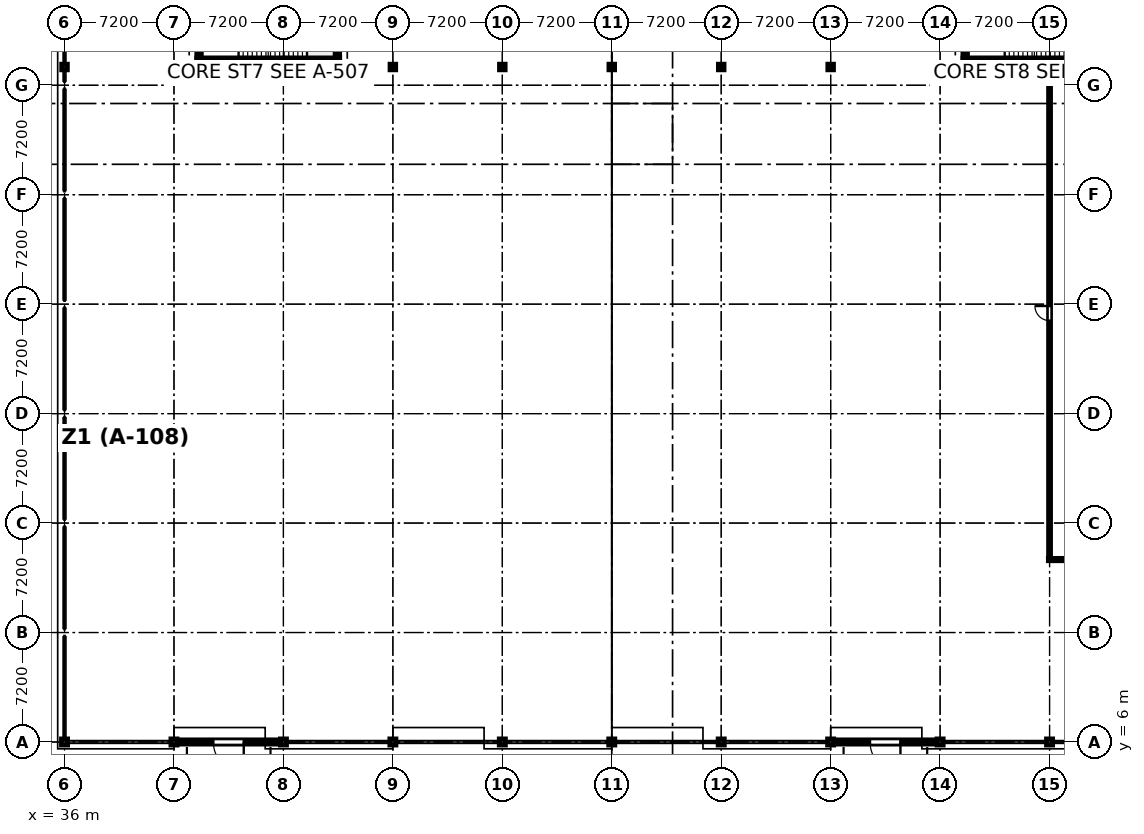
"""IFC4 building model, lengths in metres.
Left out: names, types, materials, properties, quantities, classifications, styles, units other than length and angle.
Written with IfcOpenShell. Run it as: python <this file> out.ifc"""

import sys

from ifc_helpers import new_model, si_unit, direction, frame, frame_2d, origin, origin_2d, place, context, subcontext, project, spatial, rectangle, i_section, extrude, element, fill, save


model = new_model("IFC4")
c1 = context("Model", 3, precision=1e-05, world=origin(), true_north=direction((0.0, 1.0)))
c2 = subcontext(c1, "Body", "Model", "MODEL_VIEW")
j1 = project(units=[si_unit("LENGTHUNIT", "METRE"), si_unit("PLANEANGLEUNIT", "RADIAN")], contexts=[c1])
p1 = place(None, origin())
s1 = spatial("IfcSite", under=j1, at=p1, CompositionType="ELEMENT")
p2 = place(p1, origin())
s2 = spatial("IfcBuilding", under=s1, at=p2, CompositionType="ELEMENT")
p3 = place(p2, origin())
s3 = spatial("IfcBuildingStorey", under=s2, at=p3, CompositionType="ELEMENT", Elevation=0.0)
p4 = place(p3, frame((36.0, 6.0, 0.0), z_axis=(0.0, 0.0, 1.0), x_axis=(1.0, 0.0, 0.0)))
e1 = element("IfcColumn", 1, at=p4, inside=s3, PredefinedType="COLUMN", context=c2, shape_type="SweptSolid", body=[
    extrude(i_section(OverallWidth=0.404, OverallDepth=0.406, WebThickness=0.027, FlangeThickness=0.044, FilletRadius=0.015, at=origin_2d()), origin(), (0.0, 0.0, 1.0), 6.0),
])
p5 = place(p3, frame((36.0, 50.4, 0.0), z_axis=(0.0, 0.0, 1.0), x_axis=(1.0, 0.0, 0.0)))
e2 = element("IfcColumn", 2, at=p5, inside=s3, PredefinedType="COLUMN", context=c2, shape_type="SweptSolid", body=[
    extrude(i_section(OverallWidth=0.373, OverallDepth=0.373, WebThickness=0.016, FlangeThickness=0.026, FilletRadius=0.015, at=origin_2d()), origin(), (0.0, 0.0, 1.0), 5.4),
])
p6 = place(p3, frame((43.2, 6.0, 0.0), z_axis=(0.0, 0.0, 1.0), x_axis=(1.0, 0.0, 0.0)))
e3 = element("IfcColumn", 3, at=p6, inside=s3, PredefinedType="COLUMN", context=c2, shape_type="SweptSolid", body=[
    extrude(i_section(OverallWidth=0.404, OverallDepth=0.406, WebThickness=0.027, FlangeThickness=0.044, FilletRadius=0.015, at=origin_2d()), origin(), (0.0, 0.0, 1.0), 6.0),
])
p7 = place(p3, frame((43.2, 50.4, 0.0), z_axis=(0.0, 0.0, 1.0), x_axis=(1.0, 0.0, 0.0)))
e4 = element("IfcColumn", 4, at=p7, inside=s3, PredefinedType="COLUMN", context=c2, shape_type="SweptSolid", body=[
    extrude(i_section(OverallWidth=0.373, OverallDepth=0.373, WebThickness=0.016, FlangeThickness=0.026, FilletRadius=0.015, at=origin_2d()), origin(), (0.0, 0.0, 1.0), 5.4),
])
p8 = place(p3, frame((50.4, 6.0, 0.0), z_axis=(0.0, 0.0, 1.0), x_axis=(1.0, 0.0, 0.0)))
e5 = element("IfcColumn", 5, at=p8, inside=s3, PredefinedType="COLUMN", context=c2, shape_type="SweptSolid", body=[
    extrude(i_section(OverallWidth=0.404, OverallDepth=0.406, WebThickness=0.027, FlangeThickness=0.044, FilletRadius=0.015, at=origin_2d()), origin(), (0.0, 0.0, 1.0), 6.0),
])
p9 = place(p3, frame((50.4, 50.4, 0.0), z_axis=(0.0, 0.0, 1.0), x_axis=(1.0, 0.0, 0.0)))
e6 = element("IfcColumn", 6, at=p9, inside=s3, PredefinedType="COLUMN", context=c2, shape_type="SweptSolid", body=[
    extrude(i_section(OverallWidth=0.373, OverallDepth=0.373, WebThickness=0.016, FlangeThickness=0.026, FilletRadius=0.015, at=origin_2d()), origin(), (0.0, 0.0, 1.0), 5.4),
])
p10 = place(p3, frame((57.6, 6.0, 0.0), z_axis=(0.0, 0.0, 1.0), x_axis=(1.0, 0.0, 0.0)))
e7 = element("IfcColumn", 7, at=p10, inside=s3, PredefinedType="COLUMN", context=c2, shape_type="SweptSolid", body=[
    extrude(i_section(OverallWidth=0.404, OverallDepth=0.406, WebThickness=0.027, FlangeThickness=0.044, FilletRadius=0.015, at=origin_2d()), origin(), (0.0, 0.0, 1.0), 6.0),
])
p11 = place(p3, frame((57.6, 50.4, 0.0), z_axis=(0.0, 0.0, 1.0), x_axis=(1.0, 0.0, 0.0)))
e8 = element("IfcColumn", 8, at=p11, inside=s3, PredefinedType="COLUMN", context=c2, shape_type="SweptSolid", body=[
    extrude(i_section(OverallWidth=0.373, OverallDepth=0.373, WebThickness=0.016, FlangeThickness=0.026, FilletRadius=0.015, at=origin_2d()), origin(), (0.0, 0.0, 1.0), 5.4),
])
p12 = place(p3, frame((64.8, 6.0, 0.0), z_axis=(0.0, 0.0, 1.0), x_axis=(1.0, 0.0, 0.0)))
e9 = element("IfcColumn", 9, at=p12, inside=s3, PredefinedType="COLUMN", context=c2, shape_type="SweptSolid", body=[
    extrude(i_section(OverallWidth=0.404, OverallDepth=0.406, WebThickness=0.027, FlangeThickness=0.044, FilletRadius=0.015, at=origin_2d()), origin(), (0.0, 0.0, 1.0), 6.0),
])
p13 = place(p3, frame((64.8, 50.4, 0.0), z_axis=(0.0, 0.0, 1.0), x_axis=(1.0, 0.0, 0.0)))
e10 = element("IfcColumn", 10, at=p13, inside=s3, PredefinedType="COLUMN", context=c2, shape_type="SweptSolid", body=[
    extrude(i_section(OverallWidth=0.373, OverallDepth=0.373, WebThickness=0.016, FlangeThickness=0.026, FilletRadius=0.015, at=origin_2d()), origin(), (0.0, 0.0, 1.0), 5.4),
])
p14 = place(p3, frame((72.0, 6.0, 0.0), z_axis=(0.0, 0.0, 1.0), x_axis=(1.0, 0.0, 0.0)))
e11 = element("IfcColumn", 11, at=p14, inside=s3, PredefinedType="COLUMN", context=c2, shape_type="SweptSolid", body=[
    extrude(i_section(OverallWidth=0.404, OverallDepth=0.406, WebThickness=0.027, FlangeThickness=0.044, FilletRadius=0.015, at=origin_2d()), origin(), (0.0, 0.0, 1.0), 6.0),
])
p15 = place(p3, frame((72.0, 50.4, 0.0), z_axis=(0.0, 0.0, 1.0), x_axis=(1.0, 0.0, 0.0)))
e12 = element("IfcColumn", 12, at=p15, inside=s3, PredefinedType="COLUMN", context=c2, shape_type="SweptSolid", body=[
    extrude(i_section(OverallWidth=0.373, OverallDepth=0.373, WebThickness=0.016, FlangeThickness=0.026, FilletRadius=0.015, at=origin_2d()), origin(), (0.0, 0.0, 1.0), 5.4),
])
p16 = place(p3, frame((79.2, 6.0, 0.0), z_axis=(0.0, 0.0, 1.0), x_axis=(1.0, 0.0, 0.0)))
e13 = element("IfcColumn", 13, at=p16, inside=s3, PredefinedType="COLUMN", context=c2, shape_type="SweptSolid", body=[
    extrude(i_section(OverallWidth=0.404, OverallDepth=0.406, WebThickness=0.027, FlangeThickness=0.044, FilletRadius=0.015, at=origin_2d()), origin(), (0.0, 0.0, 1.0), 6.0),
])
p17 = place(p3, frame((79.2, 50.4, 0.0), z_axis=(0.0, 0.0, 1.0), x_axis=(1.0, 0.0, 0.0)))
e14 = element("IfcColumn", 14, at=p17, inside=s3, PredefinedType="COLUMN", context=c2, shape_type="SweptSolid", body=[
    extrude(i_section(OverallWidth=0.373, OverallDepth=0.373, WebThickness=0.016, FlangeThickness=0.026, FilletRadius=0.015, at=origin_2d()), origin(), (0.0, 0.0, 1.0), 5.4),
])
p18 = place(p3, frame((86.4, 6.0, 0.0), z_axis=(0.0, 0.0, 1.0), x_axis=(1.0, 0.0, 0.0)))
e15 = element("IfcColumn", 15, at=p18, inside=s3, PredefinedType="COLUMN", context=c2, shape_type="SweptSolid", body=[
    extrude(i_section(OverallWidth=0.404, OverallDepth=0.406, WebThickness=0.027, FlangeThickness=0.044, FilletRadius=0.015, at=origin_2d()), origin(), (0.0, 0.0, 1.0), 6.0),
])
p19 = place(p3, frame((86.4, 50.4, 0.0), z_axis=(0.0, 0.0, 1.0), x_axis=(1.0, 0.0, 0.0)))
e16 = element("IfcColumn", 16, at=p19, inside=s3, PredefinedType="COLUMN", context=c2, shape_type="SweptSolid", body=[
    extrude(i_section(OverallWidth=0.373, OverallDepth=0.373, WebThickness=0.016, FlangeThickness=0.026, FilletRadius=0.015, at=origin_2d()), origin(), (0.0, 0.0, 1.0), 5.4),
])
p20 = place(p3, frame((93.6, 6.0, 0.0), z_axis=(0.0, 0.0, 1.0), x_axis=(1.0, 0.0, 0.0)))
e17 = element("IfcColumn", 17, at=p20, inside=s3, PredefinedType="COLUMN", context=c2, shape_type="SweptSolid", body=[
    extrude(i_section(OverallWidth=0.404, OverallDepth=0.406, WebThickness=0.027, FlangeThickness=0.044, FilletRadius=0.015, at=origin_2d()), origin(), (0.0, 0.0, 1.0), 6.0),
])
p21 = place(p3, frame((93.6, 50.4, 0.0), z_axis=(0.0, 0.0, 1.0), x_axis=(1.0, 0.0, 0.0)))
e18 = element("IfcColumn", 18, at=p21, inside=s3, PredefinedType="COLUMN", context=c2, shape_type="SweptSolid", body=[
    extrude(i_section(OverallWidth=0.373, OverallDepth=0.373, WebThickness=0.016, FlangeThickness=0.026, FilletRadius=0.015, at=origin_2d()), origin(), (0.0, 0.0, 1.0), 5.4),
])
p22 = place(p3, frame((100.8, 6.0, 0.0), z_axis=(0.0, 0.0, 1.0), x_axis=(1.0, 0.0, 0.0)))
e19 = element("IfcColumn", 19, at=p22, inside=s3, PredefinedType="COLUMN", context=c2, shape_type="SweptSolid", body=[
    extrude(i_section(OverallWidth=0.404, OverallDepth=0.406, WebThickness=0.027, FlangeThickness=0.044, FilletRadius=0.015, at=origin_2d()), origin(), (0.0, 0.0, 1.0), 6.0),
])
p23 = place(p3, frame((100.8, 50.4, 0.0), z_axis=(0.0, 0.0, 1.0), x_axis=(1.0, 0.0, 0.0)))
e20 = element("IfcColumn", 20, at=p23, inside=s3, PredefinedType="COLUMN", context=c2, shape_type="SweptSolid", body=[
    extrude(i_section(OverallWidth=0.373, OverallDepth=0.373, WebThickness=0.016, FlangeThickness=0.026, FilletRadius=0.015, at=origin_2d()), origin(), (0.0, 0.0, 1.0), 5.4),
])
p24 = place(p3, frame((50.191, 6.0, 0.0), z_axis=(0.0, 0.0, 1.0), x_axis=(-1.0, 0.0, 0.0)))
e21 = element("IfcWall", 21, at=p24, inside=s3, PredefinedType="STANDARD", context=c2, shape_type="SweptSolid", body=[
    extrude(rectangle(XDim=6.782, YDim=0.28, at=frame_2d((3.391, 0.0))), origin(), (0.0, 0.0, 1.0), 5.58),
])
p25 = place(p24, frame((2.401, 0.0, 0.0)))
e22 = element("IfcOpeningElement", 22, at=p25, cuts=e21, PredefinedType="OPENING", context=c2, shape_type="SweptSolid", body=[
    extrude(rectangle(XDim=2.0, YDim=2.4, at=frame_2d((1.0, 1.2))), frame((0.0, 0.15, 0.0), z_axis=(0.0, -1.0, 0.0), x_axis=(1.0, 0.0, 0.0)), (0.0, 0.0, 1.0), 0.3),
])
p26 = place(p3, frame((93.391, 6.0, 0.0), z_axis=(0.0, 0.0, 1.0), x_axis=(-1.0, 0.0, 0.0)))
e23 = element("IfcWall", 23, at=p26, inside=s3, PredefinedType="STANDARD", context=c2, shape_type="SweptSolid", body=[
    extrude(rectangle(XDim=6.782, YDim=0.28, at=frame_2d((3.391, 0.0))), origin(), (0.0, 0.0, 1.0), 5.58),
])
p27 = place(p26, frame((2.401, 0.0, 0.0)))
e24 = element("IfcOpeningElement", 24, at=p27, cuts=e23, PredefinedType="OPENING", context=c2, shape_type="SweptSolid", body=[
    extrude(rectangle(XDim=2.0, YDim=2.4, at=frame_2d((1.0, 1.2))), frame((0.0, 0.15, 0.0), z_axis=(0.0, -1.0, 0.0), x_axis=(1.0, 0.0, 0.0)), (0.0, 0.0, 1.0), 0.3),
])
p28 = place(p3, frame((54.1, 50.85, 0.0), z_axis=(0.0, 0.0, 1.0), x_axis=(-1.0, 0.0, 0.0)))
e25 = element("IfcWall", 25, at=p28, inside=s3, PredefinedType="SOLIDWALL", context=c2, shape_type="SweptSolid", body=[
    extrude(rectangle(XDim=9.4, YDim=0.3, at=frame_2d((4.7, 0.0))), origin(), (0.0, 0.0, 1.0), 5.18),
])
p29 = place(p3, frame((44.85, 51.0, 0.0), z_axis=(0.0, 0.0, 1.0), x_axis=(0.0, 1.0, 0.0)))
e26 = element("IfcWall", 26, at=p29, inside=s3, PredefinedType="SOLIDWALL", context=c2, shape_type="SweptSolid", body=[
    extrude(rectangle(XDim=3.64, YDim=0.3, at=frame_2d((1.82, 0.0))), origin(), (0.0, 0.0, 1.0), 5.18),
])
p30 = place(p29, frame((1.22, 0.0, 0.0)))
e27 = element("IfcOpeningElement", 27, at=p30, cuts=e26, PredefinedType="OPENING", context=c2, shape_type="SweptSolid", body=[
    extrude(rectangle(XDim=1.2, YDim=2.2, at=frame_2d((0.6, 1.1))), frame((0.0, 0.16, 0.0), z_axis=(0.0, -1.0, 0.0), x_axis=(1.0, 0.0, 0.0)), (0.0, 0.0, 1.0), 0.32),
])
p31 = place(p3, frame((53.95, 54.64, 0.0), z_axis=(0.0, 0.0, 1.0), x_axis=(0.0, -1.0, 0.0)))
e28 = element("IfcWall", 28, at=p31, inside=s3, PredefinedType="SOLIDWALL", context=c2, shape_type="SweptSolid", body=[
    extrude(rectangle(XDim=3.64, YDim=0.3, at=frame_2d((1.82, 0.0))), origin(), (0.0, 0.0, 1.0), 5.18),
])
p32 = place(p3, frame((104.5, 50.85, 0.0), z_axis=(0.0, 0.0, 1.0), x_axis=(-1.0, 0.0, 0.0)))
e29 = element("IfcWall", 29, at=p32, inside=s3, PredefinedType="SOLIDWALL", context=c2, shape_type="SweptSolid", body=[
    extrude(rectangle(XDim=9.4, YDim=0.3, at=frame_2d((4.7, 0.0))), origin(), (0.0, 0.0, 1.0), 5.18),
])
p33 = place(p3, frame((95.25, 51.0, 0.0), z_axis=(0.0, 0.0, 1.0), x_axis=(0.0, 1.0, 0.0)))
e30 = element("IfcWall", 30, at=p33, inside=s3, PredefinedType="SOLIDWALL", context=c2, shape_type="SweptSolid", body=[
    extrude(rectangle(XDim=3.64, YDim=0.3, at=frame_2d((1.82, 0.0))), origin(), (0.0, 0.0, 1.0), 5.18),
])
p34 = place(p33, frame((1.22, 0.0, 0.0)))
e31 = element("IfcOpeningElement", 31, at=p34, cuts=e30, PredefinedType="OPENING", context=c2, shape_type="SweptSolid", body=[
    extrude(rectangle(XDim=1.2, YDim=2.2, at=frame_2d((0.6, 1.1))), frame((0.0, 0.16, 0.0), z_axis=(0.0, -1.0, 0.0), x_axis=(1.0, 0.0, 0.0)), (0.0, 0.0, 1.0), 0.32),
])
p35 = place(p3, frame((107.918, 18.0, 0.0), z_axis=(0.0, 0.0, 1.0), x_axis=(-1.0, 0.0, 0.0)))
e32 = element("IfcWall", 32, at=p35, inside=s3, PredefinedType="PARTITIONING", context=c2, shape_type="SweptSolid", body=[
    extrude(rectangle(XDim=7.198, YDim=0.155, at=frame_2d((3.599, 0.0))), origin(), (0.0, 0.0, 1.0), 4.477),
])
p36 = place(p3, frame((100.72, 50.4, 0.0), z_axis=(0.0, 0.0, 1.0), x_axis=(1.0, 0.0, 0.0)))
e33 = element("IfcWall", 33, at=p36, inside=s3, PredefinedType="PARTITIONING", context=c2, shape_type="SweptSolid", body=[
    extrude(rectangle(XDim=7.198, YDim=0.16, at=frame_2d((3.599, 0.0))), origin(), (0.0, 0.0, 1.0), 4.477),
])
p37 = place(p3, frame((100.8, 18.08, 0.0), z_axis=(0.0, 0.0, 1.0), x_axis=(0.0, 1.0, 0.0)))
e34 = element("IfcWall", 34, at=p37, inside=s3, PredefinedType="PARTITIONING", context=c2, shape_type="SweptSolid", body=[
    extrude(rectangle(XDim=32.238, YDim=0.13, at=frame_2d((16.119, 0.0))), origin(), (0.0, 0.0, 1.0), 4.477),
])
p38 = place(p37, frame((15.639, 0.0, 0.0)))
e35 = element("IfcOpeningElement", 35, at=p38, cuts=e34, PredefinedType="OPENING", context=c2, shape_type="SweptSolid", body=[
    extrude(rectangle(XDim=0.96, YDim=2.16, at=frame_2d((0.48, 1.08))), frame((0.0, 0.075, 0.0), z_axis=(0.0, -1.0, 0.0), x_axis=(1.0, 0.0, 0.0)), (0.0, 0.0, 1.0), 0.15),
])
p39 = place(p37, frame((17.849, 0.0, 0.95)))
e36 = element("IfcOpeningElement", 36, at=p39, cuts=e34, PredefinedType="OPENING", context=c2, shape_type="SweptSolid", body=[
    extrude(rectangle(XDim=1.4, YDim=1.0, at=frame_2d((0.7, 0.5))), frame((0.0, 0.075, 0.0), z_axis=(0.0, -1.0, 0.0), x_axis=(1.0, 0.0, 0.0)), (0.0, 0.0, 1.0), 0.15),
])
p40 = place(p25, origin())
e37 = element("IfcDoor", 37, at=p40, inside=s3, OperationType="SINGLE_SWING_LEFT", PredefinedType="DOOR", context=c2, shape_type="SweptSolid", body=[
    extrude(rectangle(XDim=2.0, YDim=2.4, at=frame_2d((1.0, 1.2))), frame((0.0, 0.025, 0.0), z_axis=(0.0, -1.0, 0.0), x_axis=(1.0, 0.0, 0.0)), (0.0, 0.0, 1.0), 0.05),
])
fill(e22, e37)
p41 = place(p27, origin())
e38 = element("IfcDoor", 38, at=p41, inside=s3, OperationType="SINGLE_SWING_LEFT", PredefinedType="DOOR", context=c2, shape_type="SweptSolid", body=[
    extrude(rectangle(XDim=2.0, YDim=2.4, at=frame_2d((1.0, 1.2))), frame((0.0, 0.025, 0.0), z_axis=(0.0, -1.0, 0.0), x_axis=(1.0, 0.0, 0.0)), (0.0, 0.0, 1.0), 0.05),
])
fill(e24, e38)
p42 = place(p38, origin())
e39 = element("IfcDoor", 39, at=p42, inside=s3, OperationType="SINGLE_SWING_RIGHT", PredefinedType="DOOR", context=c2, shape_type="SweptSolid", body=[
    extrude(rectangle(XDim=0.96, YDim=2.16, at=frame_2d((0.48, 1.08))), frame((0.0, 0.025, 0.0), z_axis=(0.0, -1.0, 0.0), x_axis=(1.0, 0.0, 0.0)), (0.0, 0.0, 1.0), 0.05),
])
fill(e35, e39)
p43 = place(p39, origin())
e40 = element("IfcWindow", 40, at=p43, inside=s3, PartitioningType="SINGLE_PANEL", PredefinedType="WINDOW", context=c2, shape_type="SweptSolid", body=[
    extrude(rectangle(XDim=1.4, YDim=1.0, at=frame_2d((0.7, 0.5))), frame((0.0, 0.03, 0.0), z_axis=(0.0, -1.0, 0.0), x_axis=(1.0, 0.0, 0.0)), (0.0, 0.0, 1.0), 0.06),
])
fill(e36, e40)
save(model, sys.argv[1])
